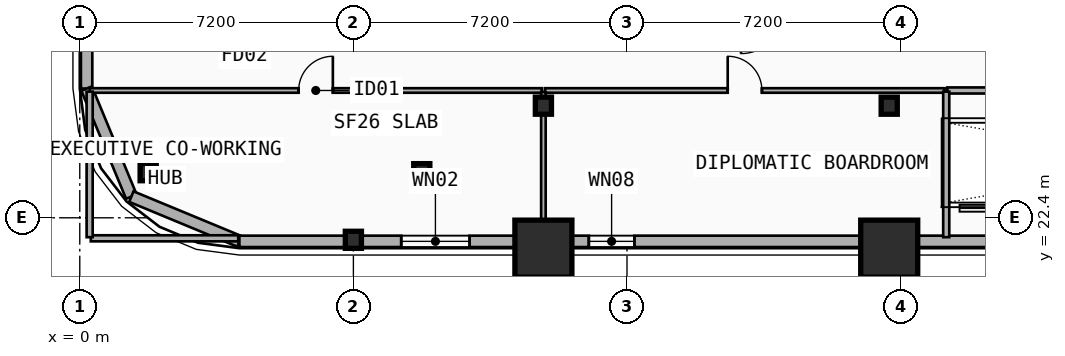
"""IFC4 building model, lengths in metres.
Left out: names, types, materials, properties, quantities, classifications, styles, units other than length and angle.
Written with IfcOpenShell. Run it as: python <this file> out.ifc"""

import sys

from ifc_helpers import new_model, si_unit, direction, frame, frame_2d, origin, origin_2d, place, context, subcontext, project, spatial, rectangle, i_section, extrude, element, fill, save


model = new_model("IFC4")
c1 = context("Model", 3, precision=1e-05, world=origin(), true_north=direction((0.0, 1.0)))
c2 = subcontext(c1, "Body", "Model", "MODEL_VIEW")
j1 = project(units=[si_unit("LENGTHUNIT", "METRE"), si_unit("PLANEANGLEUNIT", "RADIAN")], contexts=[c1])
p1 = place(None, origin())
s1 = spatial("IfcSite", under=j1, at=p1, CompositionType="ELEMENT")
p2 = place(p1, origin())
s2 = spatial("IfcBuilding", under=s1, at=p2, CompositionType="ELEMENT")
p3 = place(p2, frame((0.0, 0.0, 50.0)))
s3 = spatial("IfcBuildingStorey", under=s2, at=p3, CompositionType="ELEMENT", Elevation=50.0)
for number, where, z_axis, x_axis in (
    (1, (12.2, 25.35, 0.0), (0.0, 0.0, 1.0), (1.0, 0.0, 0.0)),
    (2, (21.3, 25.35, 0.0), (0.0, 0.0, 1.0), (1.0, 0.0, 0.0)),
):
    element("IfcColumn", number, at=place(p3, frame(where, z_axis=z_axis, x_axis=x_axis)), inside=s3, PredefinedType="COLUMN", context=c2, shape_type="SweptSolid", body=[
        extrude(i_section(OverallWidth=0.424, OverallDepth=0.45, WebThickness=0.041, FlangeThickness=0.065, FilletRadius=0.015, at=origin_2d()), origin(), (0.0, 0.0, 1.0), 3.5),
    ])
for number, where, z_axis, x_axis in (
    (3, (12.2, 21.697, 0.0), (0.0, -0.09, 0.996), (1.0, 0.0, 0.0)),
    (4, (21.3, 21.697, 0.0), (0.0, -0.09, 0.996), (1.0, 0.0, 0.0)),
):
    element("IfcColumn", number, at=place(p3, frame(where, z_axis=z_axis, x_axis=x_axis)), inside=s3, PredefinedType="COLUMN", context=c2, shape_type="SweptSolid", body=[
        extrude(rectangle(XDim=1.5, YDim=1.5, at=origin_2d()), origin(), (0.0, 0.0, 1.0), 3.514),
    ])
for number, where, z_axis, x_axis in (
    (5, (9.0, 23.6, 0.0), (0.0, 0.0, 1.0), (1.0, 0.0, 0.0)),
    (6, (1.8, 23.6, 0.0), (0.0, 0.0, 1.0), (1.0, 0.0, 0.0)),
):
    element("IfcColumn", number, at=place(p3, frame(where, z_axis=z_axis, x_axis=x_axis)), inside=s3, PredefinedType="COLUMN", context=c2, shape_type="SweptSolid", body=[
        extrude(i_section(OverallWidth=0.424, OverallDepth=0.45, WebThickness=0.041, FlangeThickness=0.065, FilletRadius=0.015, at=origin_2d()), origin(), (0.0, 0.0, 1.0), 3.5),
    ])
p4 = place(p3, frame((7.2, 21.917, 0.0), z_axis=(0.0, -0.079960777917, 0.996798010629), x_axis=(1.0, 0.0, 0.0)))
e7 = element("IfcColumn", 7, at=p4, inside=s3, PredefinedType="COLUMN", context=c2, shape_type="SweptSolid", body=[
    extrude(i_section(OverallWidth=0.424, OverallDepth=0.45, WebThickness=0.041, FlangeThickness=0.065, FilletRadius=0.015, at=origin_2d()), origin(), (0.0, 0.0, 1.0), 3.511),
])
p5 = place(p3, frame((0.18, 25.8, 0.0), z_axis=(0.0, 0.0, 1.0), x_axis=(0.0, 1.0, 0.0)))
e8 = element("IfcWall", 8, at=p5, inside=s3, PredefinedType="SOLIDWALL", context=c2, shape_type="SweptSolid", body=[
    extrude(rectangle(XDim=15.2, YDim=0.3, at=frame_2d((7.6, 0.0))), origin(), (0.0, 0.0, 1.0), 3.24),
])
p6 = place(p5, frame((2.67, 0.0, 0.48)))
e9 = element("IfcOpeningElement", 9, at=p6, cuts=e8, PredefinedType="OPENING", context=c2, shape_type="SweptSolid", body=[
    extrude(rectangle(XDim=1.4, YDim=1.8, at=frame_2d((0.7, 0.9))), frame((0.0, 0.16, 0.0), z_axis=(0.0, -1.0, 0.0), x_axis=(1.0, 0.0, 0.0)), (0.0, 0.0, 1.0), 0.32),
])
p7 = place(p5, frame((7.709, 0.0, 0.48)))
e10 = element("IfcOpeningElement", 10, at=p7, cuts=e8, PredefinedType="OPENING", context=c2, shape_type="SweptSolid", body=[
    extrude(rectangle(XDim=1.4, YDim=1.8, at=frame_2d((0.7, 0.9))), frame((0.0, 0.16, 0.0), z_axis=(0.0, -1.0, 0.0), x_axis=(1.0, 0.0, 0.0)), (0.0, 0.0, 1.0), 0.32),
])
for number, where, z_axis, x_axis in (
    (11, (1.357, 22.958, 0.0), (0.0, 0.0, 1.0), (-0.383, 0.924, 0.0)),
    (12, (4.2, 21.78, 0.0), (0.0, 0.0, 1.0), (-0.924, 0.383, 0.0)),
):
    element("IfcWall", number, at=place(p3, frame(where, z_axis=z_axis, x_axis=x_axis)), inside=s3, PredefinedType="SOLIDWALL", context=c2, shape_type="SweptSolid", body=[
        extrude(rectangle(XDim=3.077, YDim=0.3, at=frame_2d((1.538, 0.0))), origin(), (0.0, 0.0, 1.0), 3.24),
    ])
p8 = place(p3, frame((53.4, 21.78, 0.0), z_axis=(0.0, 0.0, 1.0), x_axis=(-1.0, 0.0, 0.0)))
e13 = element("IfcWall", 13, at=p8, inside=s3, PredefinedType="SOLIDWALL", context=c2, shape_type="SweptSolid", body=[
    extrude(rectangle(XDim=49.2, YDim=0.3, at=frame_2d((24.6, 0.0))), origin(), (0.0, 0.0, 1.0), 2.82),
])
p9 = place(p8, frame((43.141, 0.0, 0.65)))
e14 = element("IfcOpeningElement", 14, at=p9, cuts=e13, PredefinedType="OPENING", context=c2, shape_type="SweptSolid", body=[
    extrude(rectangle(XDim=1.8, YDim=1.8, at=frame_2d((0.9, 0.9))), frame((0.0, 0.16, 0.0), z_axis=(0.0, -1.0, 0.0), x_axis=(1.0, 0.0, 0.0)), (0.0, 0.0, 1.0), 0.32),
])
p10 = place(p8, frame((38.805, 0.0, 0.48)))
e15 = element("IfcOpeningElement", 15, at=p10, cuts=e13, PredefinedType="OPENING", context=c2, shape_type="SweptSolid", body=[
    extrude(rectangle(XDim=1.2, YDim=1.5, at=frame_2d((0.6, 0.75))), frame((0.0, 0.16, 0.0), z_axis=(0.0, -1.0, 0.0), x_axis=(1.0, 0.0, 0.0)), (0.0, 0.0, 1.0), 0.32),
])
p11 = place(p8, frame((14.655, 0.0, 0.34)))
e16 = element("IfcOpeningElement", 16, at=p11, cuts=e13, PredefinedType="OPENING", context=c2, shape_type="SweptSolid", body=[
    extrude(rectangle(XDim=1.2, YDim=1.5, at=frame_2d((0.6, 0.75))), frame((0.0, 0.16, 0.0), z_axis=(0.0, -1.0, 0.0), x_axis=(1.0, 0.0, 0.0)), (0.0, 0.0, 1.0), 0.32),
])
p12 = place(p8, frame((0.504, 0.0, 0.65)))
e17 = element("IfcOpeningElement", 17, at=p12, cuts=e13, PredefinedType="OPENING", context=c2, shape_type="SweptSolid", body=[
    extrude(rectangle(XDim=1.8, YDim=1.8, at=frame_2d((0.9, 0.9))), frame((0.0, 0.16, 0.0), z_axis=(0.0, -1.0, 0.0), x_axis=(1.0, 0.0, 0.0)), (0.0, 0.0, 1.0), 0.32),
])
p13 = place(p3, frame((0.26, 25.75, 0.0), z_axis=(0.0, 0.0, 1.0), x_axis=(1.0, 0.0, 0.0)))
e18 = element("IfcWall", 18, at=p13, inside=s3, PredefinedType="PARTITIONING", context=c2, shape_type="SweptSolid", body=[
    extrude(rectangle(XDim=11.9, YDim=0.12, at=frame_2d((5.95, 0.0))), origin(), (0.0, 0.0, 1.0), 2.28),
])
p14 = place(p13, frame((5.5, 0.0, 0.0)))
e19 = element("IfcOpeningElement", 19, at=p14, cuts=e18, PredefinedType="OPENING", context=c2, shape_type="SweptSolid", body=[
    extrude(rectangle(XDim=0.9, YDim=2.1, at=frame_2d((0.45, 1.05))), frame((0.0, 0.07, 0.0), z_axis=(0.0, -1.0, 0.0), x_axis=(1.0, 0.0, 0.0)), (0.0, 0.0, 1.0), 0.14),
])
p15 = place(p3, frame((12.24, 25.75, 0.0), z_axis=(0.0, 0.0, 1.0), x_axis=(1.0, 0.0, 0.0)))
e20 = element("IfcWall", 20, at=p15, inside=s3, PredefinedType="PARTITIONING", context=c2, shape_type="SweptSolid", body=[
    extrude(rectangle(XDim=10.52, YDim=0.12, at=frame_2d((5.26, 0.0))), origin(), (0.0, 0.0, 1.0), 2.28),
])
p16 = place(p15, frame((4.81, 0.0, 0.0)))
e21 = element("IfcOpeningElement", 21, at=p16, cuts=e20, PredefinedType="OPENING", context=c2, shape_type="SweptSolid", body=[
    extrude(rectangle(XDim=0.9, YDim=2.1, at=frame_2d((0.45, 1.05))), frame((0.0, 0.07, 0.0), z_axis=(0.0, -1.0, 0.0), x_axis=(1.0, 0.0, 0.0)), (0.0, 0.0, 1.0), 0.14),
])
p17 = place(p3, frame((12.2, 21.86, 0.0), z_axis=(0.0, 0.0, 1.0), x_axis=(0.0, 1.0, 0.0)))
e22 = element("IfcWall", 22, at=p17, inside=s3, PredefinedType="PARTITIONING", context=c2, shape_type="SweptSolid", body=[
    extrude(rectangle(XDim=3.85, YDim=0.12, at=frame_2d((1.925, 0.0))), origin(), (0.0, 0.0, 1.0), 2.28),
])
p18 = place(p3, frame((22.83, 25.75, 0.0), z_axis=(0.0, 0.0, 1.0), x_axis=(1.0, 0.0, 0.0)))
e23 = element("IfcWall", 23, at=p18, inside=s3, PredefinedType="PARTITIONING", context=c2, shape_type="SweptSolid", body=[
    extrude(rectangle(XDim=11.94, YDim=0.16, at=frame_2d((5.97, 0.0))), origin(), (0.0, 0.0, 1.0), 3.24),
])
p19 = place(p3, frame((0.29, 21.86, 0.0), z_axis=(0.0, 0.0, 1.0), x_axis=(1.0, 0.0, 0.0)))
e24 = element("IfcWall", 24, at=p19, inside=s3, PredefinedType="PARTITIONING", context=c2, shape_type="SweptSolid", body=[
    extrude(rectangle(XDim=3.88, YDim=0.16, at=frame_2d((1.94, 0.0))), origin(), (0.0, 0.0, 1.0), 2.72),
])
p20 = place(p3, frame((0.26, 21.89, 0.0), z_axis=(0.0, 0.0, 1.0), x_axis=(0.0, 1.0, 0.0)))
e25 = element("IfcWall", 25, at=p20, inside=s3, PredefinedType="PARTITIONING", context=c2, shape_type="SweptSolid", body=[
    extrude(rectangle(XDim=3.83, YDim=0.16, at=frame_2d((1.915, 0.0))), origin(), (0.0, 0.0, 1.0), 3.24),
])
p21 = place(p3, frame((22.8, 21.89, 0.0), z_axis=(0.0, 0.0, 1.0), x_axis=(0.0, 1.0, 0.0)))
e26 = element("IfcWall", 26, at=p21, inside=s3, PredefinedType="PARTITIONING", context=c2, shape_type="SweptSolid", body=[
    extrude(rectangle(XDim=3.83, YDim=0.16, at=frame_2d((1.915, 0.0))), origin(), (0.0, 0.0, 1.0), 2.68),
])
p22 = place(p9, origin())
e27 = element("IfcWindow", 27, at=p22, inside=s3, PartitioningType="SINGLE_PANEL", PredefinedType="WINDOW", context=c2, shape_type="SweptSolid", body=[
    extrude(rectangle(XDim=1.8, YDim=1.8, at=frame_2d((0.9, 0.9))), frame((0.0, 0.03, 0.0), z_axis=(0.0, -1.0, 0.0), x_axis=(1.0, 0.0, 0.0)), (0.0, 0.0, 1.0), 0.06),
])
fill(e14, e27)
p23 = place(p10, origin())
e28 = element("IfcWindow", 28, at=p23, inside=s3, PartitioningType="SINGLE_PANEL", PredefinedType="WINDOW", context=c2, shape_type="SweptSolid", body=[
    extrude(rectangle(XDim=1.2, YDim=1.5, at=frame_2d((0.6, 0.75))), frame((0.0, 0.03, 0.0), z_axis=(0.0, -1.0, 0.0), x_axis=(1.0, 0.0, 0.0)), (0.0, 0.0, 1.0), 0.06),
])
fill(e15, e28)
p24 = place(p14, origin())
e29 = element("IfcDoor", 29, at=p24, inside=s3, OperationType="SINGLE_SWING_RIGHT", PredefinedType="DOOR", context=c2, shape_type="SweptSolid", body=[
    extrude(rectangle(XDim=0.9, YDim=2.1, at=frame_2d((0.45, 1.05))), frame((0.0, 0.025, 0.0), z_axis=(0.0, -1.0, 0.0), x_axis=(1.0, 0.0, 0.0)), (0.0, 0.0, 1.0), 0.05),
])
fill(e19, e29)
p25 = place(p16, origin())
e30 = element("IfcDoor", 30, at=p25, inside=s3, OperationType="SINGLE_SWING_LEFT", PredefinedType="DOOR", context=c2, shape_type="SweptSolid", body=[
    extrude(rectangle(XDim=0.9, YDim=2.1, at=frame_2d((0.45, 1.05))), frame((0.0, 0.025, 0.0), z_axis=(0.0, -1.0, 0.0), x_axis=(1.0, 0.0, 0.0)), (0.0, 0.0, 1.0), 0.05),
])
fill(e21, e30)
save(model, sys.argv[1])
